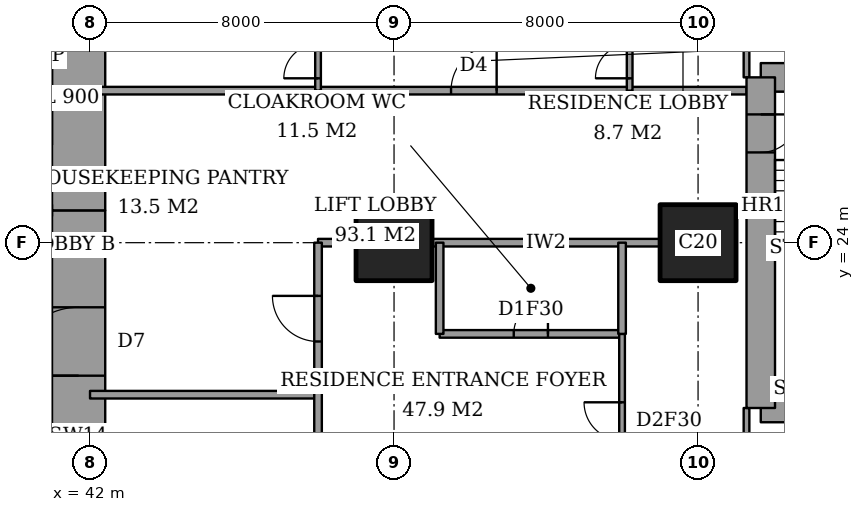
"""IFC4 building model, lengths in metres.
Left out: names, types, materials, properties, quantities, classifications, styles, units other than length and angle.
Written with IfcOpenShell. Run it as: python <this file> out.ifc"""

import sys

from ifc_helpers import new_model, si_unit, direction, frame, frame_2d, origin, origin_2d, place, context, subcontext, project, spatial, rectangle, extrude, element, fill, save


model = new_model("IFC4")
c1 = context("Model", 3, precision=1e-05, world=origin(), true_north=direction((0.0, 1.0)))
c2 = subcontext(c1, "Body", "Model", "MODEL_VIEW")
j1 = project(units=[si_unit("LENGTHUNIT", "METRE"), si_unit("PLANEANGLEUNIT", "RADIAN")], contexts=[c1])
p1 = place(None, origin())
s1 = spatial("IfcSite", under=j1, at=p1, CompositionType="ELEMENT")
p2 = place(p1, origin())
s2 = spatial("IfcBuilding", under=s1, at=p2, CompositionType="ELEMENT")
p3 = place(p2, frame((0.0, 0.0, 69.2)))
s3 = spatial("IfcBuildingStorey", under=s2, at=p3, CompositionType="ELEMENT", Elevation=69.2)
for number, where, z_axis, x_axis in (
    (1, (50.0, 24.0, 0.0), (0.0, 0.0, 1.0), (1.0, 0.0, 0.0)),
    (2, (58.0, 24.0, 0.0), (0.0, 0.0, 1.0), (1.0, 0.0, 0.0)),
):
    element("IfcColumn", number, at=place(p3, frame(where, z_axis=z_axis, x_axis=x_axis)), inside=s3, PredefinedType="COLUMN", context=c2, shape_type="SweptSolid", body=[
        extrude(rectangle(XDim=2.0, YDim=2.0, at=origin_2d()), origin(), (0.0, 0.0, 1.0), 3.6),
    ])
p4 = place(p3, frame((41.7, 13.0, 0.0), z_axis=(0.0, 0.0, 1.0), x_axis=(0.0, 1.0, 0.0)))
e3 = element("IfcWall", 3, at=p4, inside=s3, PredefinedType="SHEAR", context=c2, shape_type="SweptSolid", body=[
    extrude(rectangle(XDim=11.85, YDim=1.4, at=frame_2d((5.925, 0.0))), origin(), (0.0, 0.0, 1.0), 3.6),
])
p5 = place(p4, frame((7.5, 0.0, 0.0)))
e4 = element("IfcOpeningElement", 4, at=p5, cuts=e3, PredefinedType="OPENING", context=c2, shape_type="SweptSolid", body=[
    extrude(rectangle(XDim=1.8, YDim=2.4, at=frame_2d((0.9, 1.2))), frame((0.0, 0.71, 0.0), z_axis=(0.0, -1.0, 0.0), x_axis=(1.0, 0.0, 0.0)), (0.0, 0.0, 1.0), 1.42),
])
p6 = place(p3, frame((41.7, 24.85, 0.0), z_axis=(0.0, 0.0, 1.0), x_axis=(0.0, 1.0, 0.0)))
e5 = element("IfcWall", 5, at=p6, inside=s3, PredefinedType="SHEAR", context=c2, shape_type="SweptSolid", body=[
    extrude(rectangle(XDim=10.15, YDim=1.4, at=frame_2d((5.075, 0.0))), origin(), (0.0, 0.0, 1.0), 3.6),
])
for number, where, z_axis, x_axis in (
    (6, (59.65, 19.65, 0.0), (0.0, 0.0, 1.0), (1.0, 0.0, 0.0)),
    (7, (64.1, 28.35, 0.0), (0.0, 0.0, 1.0), (-1.0, 0.0, 0.0)),
):
    element("IfcWall", number, at=place(p3, frame(where, z_axis=z_axis, x_axis=x_axis)), inside=s3, PredefinedType="SHEAR", context=c2, shape_type="SweptSolid", body=[
        extrude(rectangle(XDim=4.45, YDim=0.75, at=frame_2d((2.225, 0.0))), origin(), (0.0, 0.0, 1.0), 3.6),
    ])
p7 = place(p3, frame((59.65, 28.35, 0.0), z_axis=(0.0, 0.0, 1.0), x_axis=(0.0, -1.0, 0.0)))
e8 = element("IfcWall", 8, at=p7, inside=s3, PredefinedType="SHEAR", context=c2, shape_type="SweptSolid", body=[
    extrude(rectangle(XDim=8.7, YDim=0.75, at=frame_2d((4.35, 0.0))), origin(), (0.0, 0.0, 1.0), 3.6),
])
p8 = place(p7, frame((0.975, 0.0, 0.0)))
e9 = element("IfcOpeningElement", 9, at=p8, cuts=e8, PredefinedType="OPENING", context=c2, shape_type="SweptSolid", body=[
    extrude(rectangle(XDim=1.0, YDim=2.1, at=frame_2d((0.5, 1.05))), frame((0.0, 0.385, 0.0), z_axis=(0.0, -1.0, 0.0), x_axis=(1.0, 0.0, 0.0)), (0.0, 0.0, 1.0), 0.77),
])
p9 = place(p3, frame((42.0, 20.0, 0.0), z_axis=(0.0, 0.0, 1.0), x_axis=(1.0, 0.0, 0.0)))
e10 = element("IfcWall", 10, at=p9, inside=s3, PredefinedType="PARTITIONING", context=c2, shape_type="SweptSolid", body=[
    extrude(rectangle(XDim=6.0, YDim=0.2, at=frame_2d((3.0, 0.0))), origin(), (0.0, 0.0, 1.0), 3.35),
])
p10 = place(p3, frame((51.2, 21.6, 0.0), z_axis=(0.0, 0.0, 1.0), x_axis=(1.0, 0.0, 0.0)))
e11 = element("IfcWall", 11, at=p10, inside=s3, PredefinedType="PARTITIONING", context=c2, shape_type="SweptSolid", body=[
    extrude(rectangle(XDim=4.8, YDim=0.2, at=frame_2d((2.4, 0.0))), origin(), (0.0, 0.0, 1.0), 3.35),
])
p11 = place(p10, frame((1.95, 0.0, 0.0)))
e12 = element("IfcOpeningElement", 12, at=p11, cuts=e11, PredefinedType="OPENING", context=c2, shape_type="SweptSolid", body=[
    extrude(rectangle(XDim=0.9, YDim=2.1, at=frame_2d((0.45, 1.05))), frame((0.0, 0.11, 0.0), z_axis=(0.0, -1.0, 0.0), x_axis=(1.0, 0.0, 0.0)), (0.0, 0.0, 1.0), 0.22),
])
p12 = place(p3, frame((48.0, 24.0, 0.0), z_axis=(0.0, 0.0, 1.0), x_axis=(1.0, 0.0, 0.0)))
e13 = element("IfcWall", 13, at=p12, inside=s3, PredefinedType="PARTITIONING", context=c2, shape_type="SweptSolid", body=[
    extrude(rectangle(XDim=1.0, YDim=0.2, at=frame_2d((0.5, 0.0))), origin(), (0.0, 0.0, 1.0), 3.35),
])
p13 = place(p3, frame((51.0, 24.0, 0.0), z_axis=(0.0, 0.0, 1.0), x_axis=(1.0, 0.0, 0.0)))
e14 = element("IfcWall", 14, at=p13, inside=s3, PredefinedType="PARTITIONING", context=c2, shape_type="SweptSolid", body=[
    extrude(rectangle(XDim=6.0, YDim=0.2, at=frame_2d((3.0, 0.0))), origin(), (0.0, 0.0, 1.0), 3.35),
])
p14 = place(p3, frame((42.0, 28.0, 0.0), z_axis=(0.0, 0.0, 1.0), x_axis=(1.0, 0.0, 0.0)))
e15 = element("IfcWall", 15, at=p14, inside=s3, PredefinedType="PARTITIONING", context=c2, shape_type="SweptSolid", body=[
    extrude(rectangle(XDim=17.275, YDim=0.2, at=frame_2d((8.637, 0.0))), origin(), (0.0, 0.0, 1.0), 3.35),
])
p15 = place(p14, frame((9.5, 0.0, 0.0)))
e16 = element("IfcOpeningElement", 16, at=p15, cuts=e15, PredefinedType="OPENING", context=c2, shape_type="SweptSolid", body=[
    extrude(rectangle(XDim=1.2, YDim=2.4, at=frame_2d((0.6, 1.2))), frame((0.0, 0.11, 0.0), z_axis=(0.0, -1.0, 0.0), x_axis=(1.0, 0.0, 0.0)), (0.0, 0.0, 1.0), 0.22),
])
p16 = place(p3, frame((48.0, 17.0, 0.0), z_axis=(0.0, 0.0, 1.0), x_axis=(0.0, 1.0, 0.0)))
e17 = element("IfcWall", 17, at=p16, inside=s3, PredefinedType="PARTITIONING", context=c2, shape_type="SweptSolid", body=[
    extrude(rectangle(XDim=7.0, YDim=0.2, at=frame_2d((3.5, 0.0))), origin(), (0.0, 0.0, 1.0), 3.35),
])
p17 = place(p16, frame((4.4, 0.0, 0.0)))
e18 = element("IfcOpeningElement", 18, at=p17, cuts=e17, PredefinedType="OPENING", context=c2, shape_type="SweptSolid", body=[
    extrude(rectangle(XDim=1.2, YDim=2.4, at=frame_2d((0.6, 1.2))), frame((0.0, 0.11, 0.0), z_axis=(0.0, -1.0, 0.0), x_axis=(1.0, 0.0, 0.0)), (0.0, 0.0, 1.0), 0.22),
])
p18 = place(p16, frame((1.05, 0.0, 0.0)))
e19 = element("IfcOpeningElement", 19, at=p18, cuts=e17, PredefinedType="OPENING", context=c2, shape_type="SweptSolid", body=[
    extrude(rectangle(XDim=0.9, YDim=2.1, at=frame_2d((0.45, 1.05))), frame((0.0, 0.11, 0.0), z_axis=(0.0, -1.0, 0.0), x_axis=(1.0, 0.0, 0.0)), (0.0, 0.0, 1.0), 0.22),
])
p19 = place(p3, frame((48.0, 28.0, 0.0), z_axis=(0.0, 0.0, 1.0), x_axis=(0.0, 1.0, 0.0)))
e20 = element("IfcWall", 20, at=p19, inside=s3, PredefinedType="PARTITIONING", context=c2, shape_type="SweptSolid", body=[
    extrude(rectangle(XDim=9.4, YDim=0.15, at=frame_2d((4.7, 0.0))), origin(), (0.0, 0.0, 1.0), 3.35),
])
p20 = place(p19, frame((0.325, 0.0, 0.0)))
e21 = element("IfcOpeningElement", 21, at=p20, cuts=e20, PredefinedType="OPENING", context=c2, shape_type="SweptSolid", body=[
    extrude(rectangle(XDim=0.9, YDim=2.1, at=frame_2d((0.45, 1.05))), frame((0.0, 0.085, 0.0), z_axis=(0.0, -1.0, 0.0), x_axis=(1.0, 0.0, 0.0)), (0.0, 0.0, 1.0), 0.17),
])
for number, where, z_axis, x_axis in (
    (22, (51.2, 21.6, 0.0), (0.0, 0.0, 1.0), (0.0, 1.0, 0.0)),
    (23, (56.0, 21.6, 0.0), (0.0, 0.0, 1.0), (0.0, 1.0, 0.0)),
):
    element("IfcWall", number, at=place(p3, frame(where, z_axis=z_axis, x_axis=x_axis)), inside=s3, PredefinedType="PARTITIONING", context=c2, shape_type="SweptSolid", body=[
        extrude(rectangle(XDim=2.4, YDim=0.2, at=frame_2d((1.2, 0.0))), origin(), (0.0, 0.0, 1.0), 3.35),
    ])
p21 = place(p3, frame((56.0, 10.6, 0.0), z_axis=(0.0, 0.0, 1.0), x_axis=(0.0, 1.0, 0.0)))
e24 = element("IfcWall", 24, at=p21, inside=s3, PredefinedType="PARTITIONING", context=c2, shape_type="SweptSolid", body=[
    extrude(rectangle(XDim=11.0, YDim=0.15, at=frame_2d((5.5, 0.0))), origin(), (0.0, 0.0, 1.0), 3.35),
])
p22 = place(p21, frame((8.2, 0.0, 0.0)))
e25 = element("IfcOpeningElement", 25, at=p22, cuts=e24, PredefinedType="OPENING", context=c2, shape_type="SweptSolid", body=[
    extrude(rectangle(XDim=1.0, YDim=2.1, at=frame_2d((0.5, 1.05))), frame((0.0, 0.085, 0.0), z_axis=(0.0, -1.0, 0.0), x_axis=(1.0, 0.0, 0.0)), (0.0, 0.0, 1.0), 0.17),
])
p23 = place(p3, frame((56.2, 28.0, 0.0), z_axis=(0.0, 0.0, 1.0), x_axis=(0.0, 1.0, 0.0)))
e26 = element("IfcWall", 26, at=p23, inside=s3, PredefinedType="PARTITIONING", context=c2, shape_type="SweptSolid", body=[
    extrude(rectangle(XDim=9.4, YDim=0.15, at=frame_2d((4.7, 0.0))), origin(), (0.0, 0.0, 1.0), 3.35),
])
p24 = place(p23, frame((0.325, 0.0, 0.0)))
e27 = element("IfcOpeningElement", 27, at=p24, cuts=e26, PredefinedType="OPENING", context=c2, shape_type="SweptSolid", body=[
    extrude(rectangle(XDim=0.9, YDim=2.1, at=frame_2d((0.45, 1.05))), frame((0.0, 0.085, 0.0), z_axis=(0.0, -1.0, 0.0), x_axis=(1.0, 0.0, 0.0)), (0.0, 0.0, 1.0), 0.17),
])
p25 = place(p3, frame((59.275, 17.2, 0.0), z_axis=(0.0, 0.0, 1.0), x_axis=(0.0, 1.0, 0.0)))
e28 = element("IfcWall", 28, at=p25, inside=s3, PredefinedType="PARTITIONING", context=c2, shape_type="SweptSolid", body=[
    extrude(rectangle(XDim=2.45, YDim=0.15, at=frame_2d((1.225, 0.0))), origin(), (0.0, 0.0, 1.0), 3.35),
])
p26 = place(p25, frame((0.538, 0.0, 0.0)))
e29 = element("IfcOpeningElement", 29, at=p26, cuts=e28, PredefinedType="OPENING", context=c2, shape_type="SweptSolid", body=[
    extrude(rectangle(XDim=1.0, YDim=2.1, at=frame_2d((0.5, 1.05))), frame((0.0, 0.085, 0.0), z_axis=(0.0, -1.0, 0.0), x_axis=(1.0, 0.0, 0.0)), (0.0, 0.0, 1.0), 0.17),
])
p27 = place(p3, frame((59.275, 28.35, 0.0), z_axis=(0.0, 0.0, 1.0), x_axis=(0.0, 1.0, 0.0)))
e30 = element("IfcWall", 30, at=p27, inside=s3, PredefinedType="PARTITIONING", context=c2, shape_type="SweptSolid", body=[
    extrude(rectangle(XDim=2.45, YDim=0.15, at=frame_2d((1.225, 0.0))), origin(), (0.0, 0.0, 1.0), 3.35),
])
p28 = place(p27, frame((0.913, 0.0, 0.0)))
e31 = element("IfcOpeningElement", 31, at=p28, cuts=e30, PredefinedType="OPENING", context=c2, shape_type="SweptSolid", body=[
    extrude(rectangle(XDim=1.0, YDim=2.1, at=frame_2d((0.5, 1.05))), frame((0.0, 0.085, 0.0), z_axis=(0.0, -1.0, 0.0), x_axis=(1.0, 0.0, 0.0)), (0.0, 0.0, 1.0), 0.17),
])
p29 = place(p22, origin())
e32 = element("IfcDoor", 32, at=p29, inside=s3, OperationType="SINGLE_SWING_LEFT", PredefinedType="DOOR", context=c2, shape_type="SweptSolid", body=[
    extrude(rectangle(XDim=1.0, YDim=2.1, at=frame_2d((0.5, 1.05))), frame((0.0, 0.025, 0.0), z_axis=(0.0, -1.0, 0.0), x_axis=(1.0, 0.0, 0.0)), (0.0, 0.0, 1.0), 0.05),
])
fill(e25, e32)
p30 = place(p11, origin())
e33 = element("IfcDoor", 33, at=p30, inside=s3, OperationType="SINGLE_SWING_LEFT", PredefinedType="DOOR", context=c2, shape_type="SweptSolid", body=[
    extrude(rectangle(XDim=0.9, YDim=2.1, at=frame_2d((0.45, 1.05))), frame((0.0, 0.025, 0.0), z_axis=(0.0, -1.0, 0.0), x_axis=(1.0, 0.0, 0.0)), (0.0, 0.0, 1.0), 0.05),
])
fill(e12, e33)
p31 = place(p17, origin())
e34 = element("IfcDoor", 34, at=p31, inside=s3, OperationType="SINGLE_SWING_LEFT", PredefinedType="DOOR", context=c2, shape_type="SweptSolid", body=[
    extrude(rectangle(XDim=1.2, YDim=2.4, at=frame_2d((0.6, 1.2))), frame((0.0, 0.025, 0.0), z_axis=(0.0, -1.0, 0.0), x_axis=(1.0, 0.0, 0.0)), (0.0, 0.0, 1.0), 0.05),
])
fill(e18, e34)
p32 = place(p24, origin())
e35 = element("IfcDoor", 35, at=p32, inside=s3, OperationType="SINGLE_SWING_RIGHT", PredefinedType="DOOR", context=c2, shape_type="SweptSolid", body=[
    extrude(rectangle(XDim=0.9, YDim=2.1, at=frame_2d((0.45, 1.05))), frame((0.0, 0.025, 0.0), z_axis=(0.0, -1.0, 0.0), x_axis=(1.0, 0.0, 0.0)), (0.0, 0.0, 1.0), 0.05),
])
fill(e27, e35)
p33 = place(p15, origin())
e36 = element("IfcDoor", 36, at=p33, inside=s3, OperationType="SINGLE_SWING_LEFT", PredefinedType="DOOR", context=c2, shape_type="SweptSolid", body=[
    extrude(rectangle(XDim=1.2, YDim=2.4, at=frame_2d((0.6, 1.2))), frame((0.0, 0.025, 0.0), z_axis=(0.0, -1.0, 0.0), x_axis=(1.0, 0.0, 0.0)), (0.0, 0.0, 1.0), 0.05),
])
fill(e16, e36)
p34 = place(p20, origin())
e37 = element("IfcDoor", 37, at=p34, inside=s3, OperationType="SINGLE_SWING_RIGHT", PredefinedType="DOOR", context=c2, shape_type="SweptSolid", body=[
    extrude(rectangle(XDim=0.9, YDim=2.1, at=frame_2d((0.45, 1.05))), frame((0.0, 0.025, 0.0), z_axis=(0.0, -1.0, 0.0), x_axis=(1.0, 0.0, 0.0)), (0.0, 0.0, 1.0), 0.05),
])
fill(e21, e37)
p35 = place(p5, origin())
e38 = element("IfcDoor", 38, at=p35, inside=s3, OperationType="DOUBLE_DOOR_DOUBLE_SWING", PredefinedType="DOOR", context=c2, shape_type="SweptSolid", body=[
    extrude(rectangle(XDim=1.8, YDim=2.4, at=frame_2d((0.9, 1.2))), frame((0.0, 0.025, 0.0), z_axis=(0.0, -1.0, 0.0), x_axis=(1.0, 0.0, 0.0)), (0.0, 0.0, 1.0), 0.05),
])
fill(e4, e38)
p36 = place(p8, origin())
e39 = element("IfcDoor", 39, at=p36, inside=s3, OperationType="SINGLE_SWING_RIGHT", PredefinedType="DOOR", context=c2, shape_type="SweptSolid", body=[
    extrude(rectangle(XDim=1.0, YDim=2.1, at=frame_2d((0.5, 1.05))), frame((0.0, 0.025, 0.0), z_axis=(0.0, -1.0, 0.0), x_axis=(1.0, 0.0, 0.0)), (0.0, 0.0, 1.0), 0.05),
])
fill(e9, e39)
save(model, sys.argv[1])
